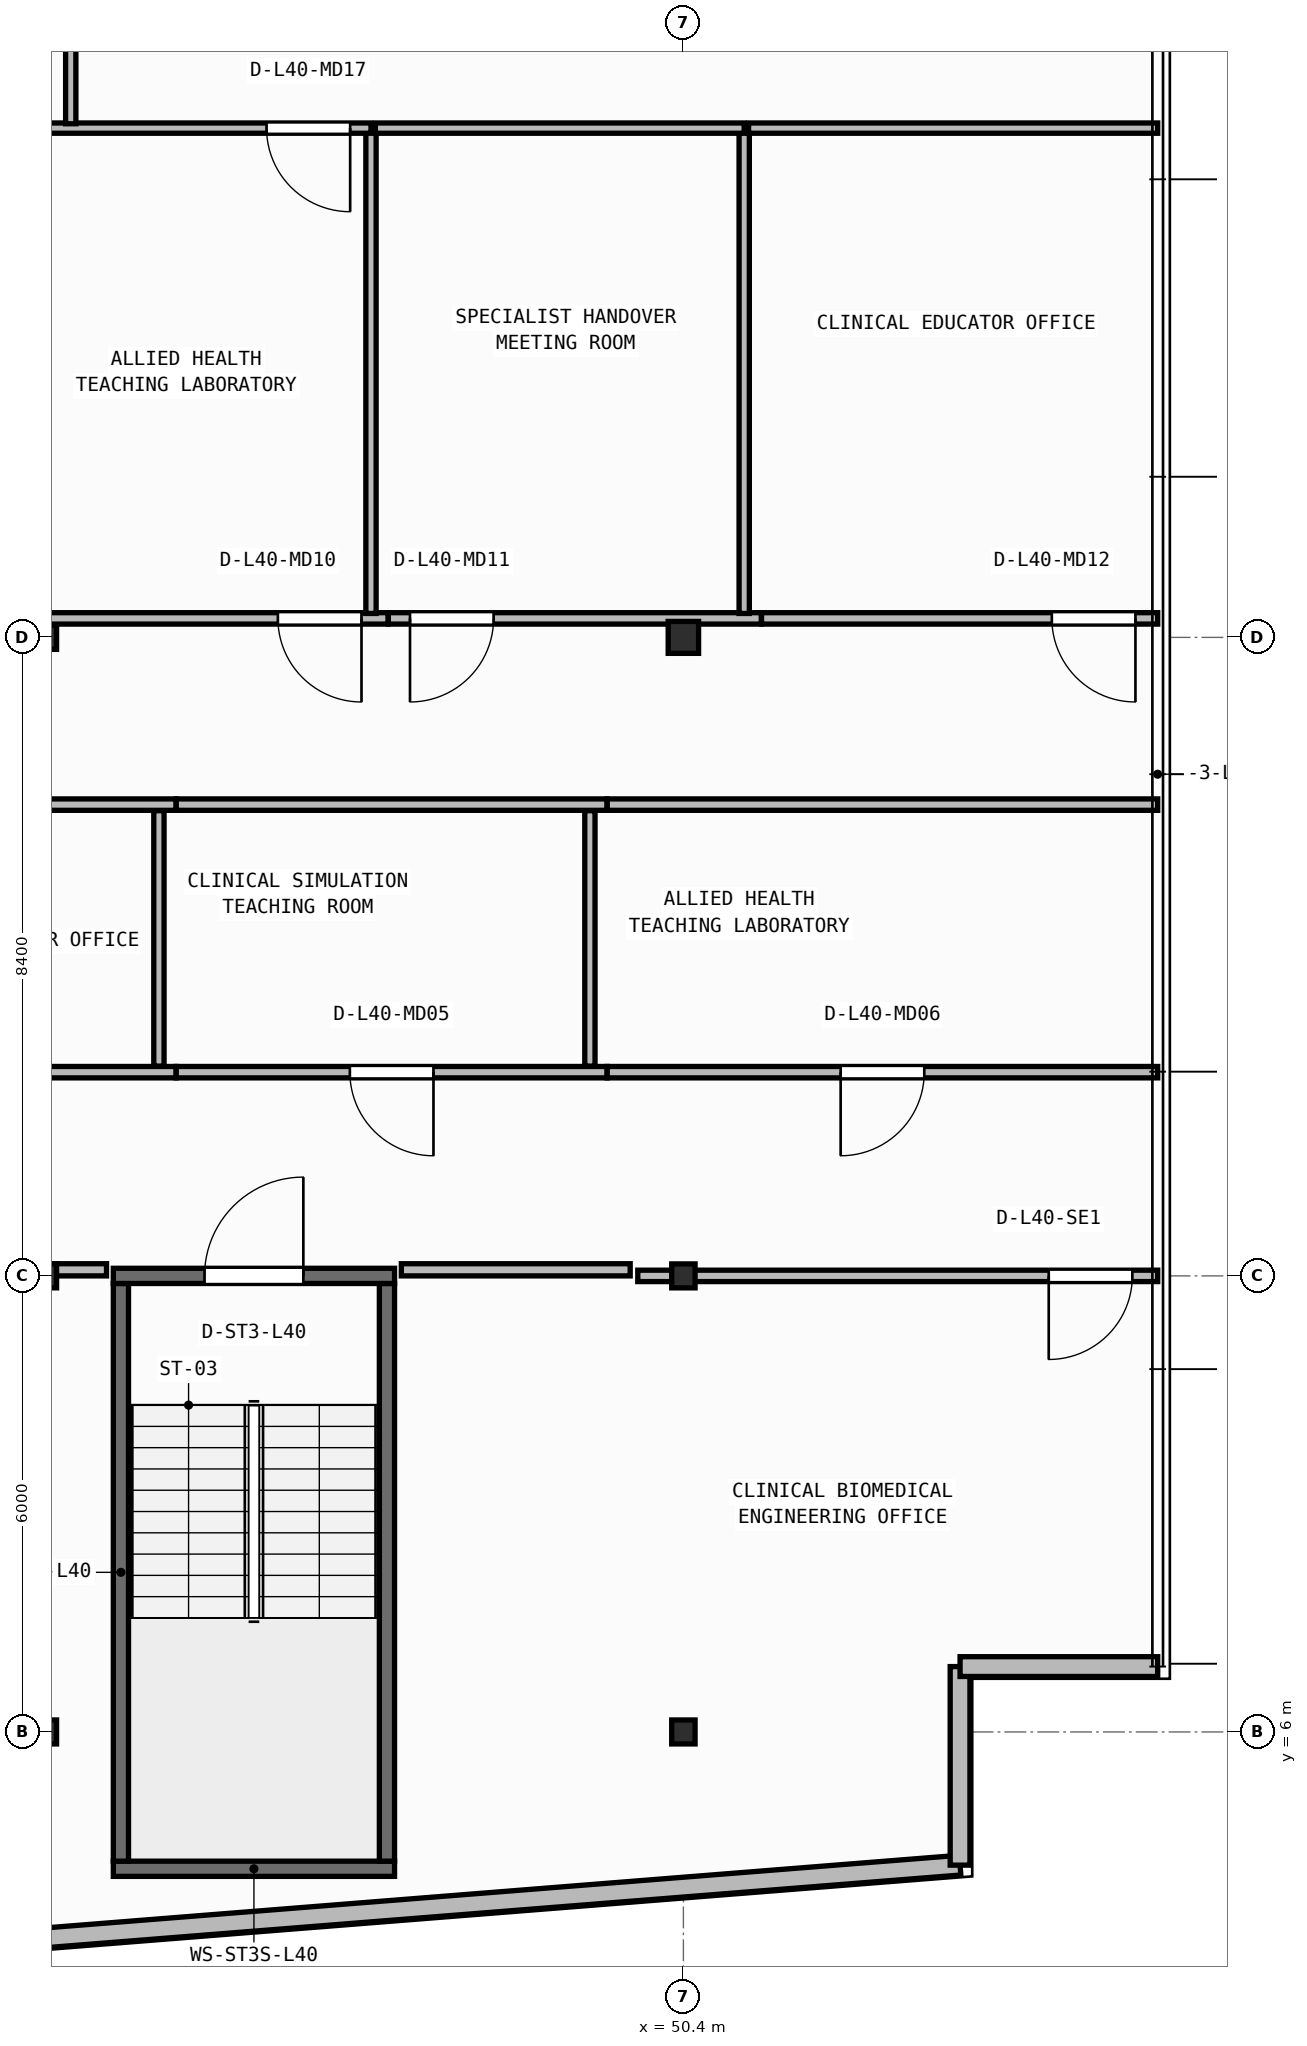
"""IFC4 building model, lengths in metres.
Left out: names, types, materials, properties, quantities, classifications, styles, units other than length and angle.
Written with IfcOpenShell. Run it as: python <this file> out.ifc"""

import sys

from ifc_helpers import new_model, si_unit, direction, frame, frame_2d, origin, origin_2d, place, context, subcontext, project, spatial, rectangle, i_section, extrude, element, fill, save


model = new_model("IFC4")
c1 = context("Model", 3, precision=1e-05, world=origin(), true_north=direction((0.0, 1.0)))
c2 = subcontext(c1, "Body", "Model", "MODEL_VIEW")
j1 = project(units=[si_unit("LENGTHUNIT", "METRE"), si_unit("PLANEANGLEUNIT", "RADIAN")], contexts=[c1])
p1 = place(None, origin())
s1 = spatial("IfcSite", under=j1, at=p1, CompositionType="ELEMENT")
p2 = place(p1, origin())
s2 = spatial("IfcBuilding", under=s1, at=p2, CompositionType="ELEMENT")
p3 = place(p2, frame((0.0, 0.0, 162.6)))
s3 = spatial("IfcBuildingStorey", under=s2, at=p3, CompositionType="ELEMENT", Elevation=162.6)
for number, where, z_axis, x_axis in (
    (1, (42.0, 6.0, 0.0), (0.0, 0.0, 1.0), (1.0, 0.0, 0.0)),
    (2, (50.4, 6.0, 0.0), (0.0, 0.0, 1.0), (1.0, 0.0, 0.0)),
    (3, (42.0, 12.0, 0.0), (0.0, 0.0, 1.0), (1.0, 0.0, 0.0)),
    (4, (50.4, 12.0, 0.0), (0.0, 0.0, 1.0), (1.0, 0.0, 0.0)),
    (5, (42.0, 20.4, 0.0), (0.0, 0.0, 1.0), (1.0, 0.0, 0.0)),
):
    element("IfcColumn", number, at=place(p3, frame(where, z_axis=z_axis, x_axis=x_axis)), inside=s3, PredefinedType="COLUMN", context=c2, shape_type="SweptSolid", body=[
        extrude(i_section(OverallWidth=0.307, OverallDepth=0.315, WebThickness=0.012, FlangeThickness=0.019, FilletRadius=0.017, at=origin_2d()), origin(), (0.0, 0.0, 1.0), 3.95),
    ])
p4 = place(p3, frame((50.4, 20.4, 0.0), z_axis=(0.0, 0.0, 1.0), x_axis=(1.0, 0.0, 0.0)))
e6 = element("IfcColumn", 6, at=p4, inside=s3, PredefinedType="COLUMN", context=c2, shape_type="SweptSolid", body=[
    extrude(i_section(OverallWidth=0.4, OverallDepth=0.42, WebThickness=0.025, FlangeThickness=0.04, at=origin_2d()), origin(), (0.0, 0.0, 1.0), 3.95),
])
p5 = place(p3, frame((2.76, 0.173, 0.0), z_axis=(0.0, 0.0, 1.0), x_axis=(0.996857931723, 0.079210251617, 0.0)))
e7 = element("IfcWall", 7, at=p5, inside=s3, PredefinedType="STANDARD", context=c2, shape_type="SweptSolid", body=[
    extrude(rectangle(XDim=51.442, YDim=0.26, at=frame_2d((25.721, 0.0))), origin(), (0.0, 0.0, 1.0), 3.71),
])
p6 = place(p5, frame((24.521, 0.0, 0.9)))
e8 = element("IfcOpeningElement", 8, at=p6, cuts=e7, PredefinedType="OPENING", context=c2, shape_type="SweptSolid", body=[
    extrude(rectangle(XDim=2.4, YDim=1.65, at=frame_2d((1.2, 0.825))), frame((0.0, 0.14, 0.0), z_axis=(0.0, -1.0, 0.0), x_axis=(1.0, 0.0, 0.0)), (0.0, 0.0, 1.0), 0.28),
])
p7 = place(p3, frame((54.04, 4.248, 0.0), z_axis=(0.0, 0.0, 1.0), x_axis=(0.0, 1.0, 0.0)))
e9 = element("IfcWall", 9, at=p7, inside=s3, PredefinedType="STANDARD", context=c2, shape_type="SweptSolid", body=[
    extrude(rectangle(XDim=2.612, YDim=0.26, at=frame_2d((1.306, 0.0))), origin(), (0.0, 0.0, 1.0), 3.71),
])
p8 = place(p3, frame((54.04, 6.86, 0.0), z_axis=(0.0, 0.0, 1.0), x_axis=(1.0, 0.0, 0.0)))
e10 = element("IfcWall", 10, at=p8, inside=s3, PredefinedType="STANDARD", context=c2, shape_type="SweptSolid", body=[
    extrude(rectangle(XDim=2.6, YDim=0.26, at=frame_2d((1.3, 0.0))), origin(), (0.0, 0.0, 1.0), 3.71),
])
p9 = place(p3, frame((42.9, 4.2, 0.0), z_axis=(0.0, 0.0, 1.0), x_axis=(1.0, 0.0, 0.0)))
e11 = element("IfcWall", 11, at=p9, inside=s3, PredefinedType="SHEAR", context=c2, shape_type="SweptSolid", body=[
    extrude(rectangle(XDim=3.7, YDim=0.2, at=frame_2d((1.85, 0.0))), origin(), (0.0, 0.0, 1.0), 3.71),
])
for number, where, z_axis, x_axis in (
    (12, (43.0, 4.3, 0.0), (0.0, 0.0, 1.0), (0.0, 1.0, 0.0)),
    (13, (46.5, 4.3, 0.0), (0.0, 0.0, 1.0), (0.0, 1.0, 0.0)),
):
    element("IfcWall", number, at=place(p3, frame(where, z_axis=z_axis, x_axis=x_axis)), inside=s3, PredefinedType="SHEAR", context=c2, shape_type="SweptSolid", body=[
        extrude(rectangle(XDim=7.6, YDim=0.2, at=frame_2d((3.8, 0.0))), origin(), (0.0, 0.0, 1.0), 3.71),
    ])
p10 = place(p3, frame((42.9, 12.0, 0.0), z_axis=(0.0, 0.0, 1.0), x_axis=(1.0, 0.0, 0.0)))
e14 = element("IfcWall", 14, at=p10, inside=s3, PredefinedType="SHEAR", context=c2, shape_type="SweptSolid", body=[
    extrude(rectangle(XDim=3.7, YDim=0.2, at=frame_2d((1.85, 0.0))), origin(), (0.0, 0.0, 1.0), 3.71),
])
p11 = place(p10, frame((1.2, 0.0, 0.0)))
e15 = element("IfcOpeningElement", 15, at=p11, cuts=e14, PredefinedType="OPENING", context=c2, shape_type="SweptSolid", body=[
    extrude(rectangle(XDim=1.3, YDim=2.15, at=frame_2d((0.65, 1.075))), frame((0.0, 0.11, 0.0), z_axis=(0.0, -1.0, 0.0), x_axis=(1.0, 0.0, 0.0)), (0.0, 0.0, 1.0), 0.22),
])
p12 = place(p3, frame((56.64, 12.0, 0.0), z_axis=(0.0, 0.0, 1.0), x_axis=(-1.0, 0.0, 0.0)))
e16 = element("IfcWall", 16, at=p12, inside=s3, PredefinedType="PARTITIONING", context=c2, shape_type="SweptSolid", body=[
    extrude(rectangle(XDim=6.84, YDim=0.15, at=frame_2d((3.42, 0.0))), origin(), (0.0, 0.0, 1.0), 3.083),
])
p13 = place(p12, frame((0.333, 0.0, 0.0)))
e17 = element("IfcOpeningElement", 17, at=p13, cuts=e16, PredefinedType="OPENING", context=c2, shape_type="SweptSolid", body=[
    extrude(rectangle(XDim=1.1, YDim=2.1, at=frame_2d((0.55, 1.05))), frame((0.0, 0.085, 0.0), z_axis=(0.0, -1.0, 0.0), x_axis=(1.0, 0.0, 0.0)), (0.0, 0.0, 1.0), 0.17),
])
p14 = place(p3, frame((43.726, 14.68, 0.0), z_axis=(0.0, 0.0, 1.0), x_axis=(-1.0, 0.0, 0.0)))
e18 = element("IfcWall", 18, at=p14, inside=s3, PredefinedType="PARTITIONING", context=c2, shape_type="SweptSolid", body=[
    extrude(rectangle(XDim=11.718, YDim=0.15, at=frame_2d((5.859, 0.0))), origin(), (0.0, 0.0, 1.0), 3.71),
])
p15 = place(p14, frame((5.309, 0.0, 0.0)))
e19 = element("IfcOpeningElement", 19, at=p15, cuts=e18, PredefinedType="OPENING", context=c2, shape_type="SweptSolid", body=[
    extrude(rectangle(XDim=1.1, YDim=2.1, at=frame_2d((0.55, 1.05))), frame((0.0, 0.085, 0.0), z_axis=(0.0, -1.0, 0.0), x_axis=(1.0, 0.0, 0.0)), (0.0, 0.0, 1.0), 0.17),
])
p16 = place(p3, frame((49.396, 14.68, 0.0), z_axis=(0.0, 0.0, 1.0), x_axis=(-1.0, 0.0, 0.0)))
e20 = element("IfcWall", 20, at=p16, inside=s3, PredefinedType="PARTITIONING", context=c2, shape_type="SweptSolid", body=[
    extrude(rectangle(XDim=5.668, YDim=0.15, at=frame_2d((2.834, 0.0))), origin(), (0.0, 0.0, 1.0), 3.71),
])
p17 = place(p16, frame((2.284, 0.0, 0.0)))
e21 = element("IfcOpeningElement", 21, at=p17, cuts=e20, PredefinedType="OPENING", context=c2, shape_type="SweptSolid", body=[
    extrude(rectangle(XDim=1.1, YDim=2.1, at=frame_2d((0.55, 1.05))), frame((0.0, 0.085, 0.0), z_axis=(0.0, -1.0, 0.0), x_axis=(1.0, 0.0, 0.0)), (0.0, 0.0, 1.0), 0.17),
])
p18 = place(p3, frame((56.64, 14.68, 0.0), z_axis=(0.0, 0.0, 1.0), x_axis=(-1.0, 0.0, 0.0)))
e22 = element("IfcWall", 22, at=p18, inside=s3, PredefinedType="PARTITIONING", context=c2, shape_type="SweptSolid", body=[
    extrude(rectangle(XDim=7.242, YDim=0.15, at=frame_2d((3.621, 0.0))), origin(), (0.0, 0.0, 1.0), 3.71),
])
p19 = place(p18, frame((3.071, 0.0, 0.0)))
e23 = element("IfcOpeningElement", 23, at=p19, cuts=e22, PredefinedType="OPENING", context=c2, shape_type="SweptSolid", body=[
    extrude(rectangle(XDim=1.1, YDim=2.1, at=frame_2d((0.55, 1.05))), frame((0.0, 0.085, 0.0), z_axis=(0.0, -1.0, 0.0), x_axis=(1.0, 0.0, 0.0)), (0.0, 0.0, 1.0), 0.17),
])
p20 = place(p3, frame((32.008, 18.2, 0.0), z_axis=(0.0, 0.0, 1.0), x_axis=(1.0, 0.0, 0.0)))
e24 = element("IfcWall", 24, at=p20, inside=s3, PredefinedType="PARTITIONING", context=c2, shape_type="SweptSolid", body=[
    extrude(rectangle(XDim=11.718, YDim=0.15, at=frame_2d((5.859, 0.0))), origin(), (0.0, 0.0, 1.0), 3.71),
])
p21 = place(p3, frame((43.728, 18.2, 0.0), z_axis=(0.0, 0.0, 1.0), x_axis=(1.0, 0.0, 0.0)))
e25 = element("IfcWall", 25, at=p21, inside=s3, PredefinedType="PARTITIONING", context=c2, shape_type="SweptSolid", body=[
    extrude(rectangle(XDim=5.668, YDim=0.15, at=frame_2d((2.834, 0.0))), origin(), (0.0, 0.0, 1.0), 3.71),
])
p22 = place(p3, frame((49.398, 18.2, 0.0), z_axis=(0.0, 0.0, 1.0), x_axis=(1.0, 0.0, 0.0)))
e26 = element("IfcWall", 26, at=p22, inside=s3, PredefinedType="PARTITIONING", context=c2, shape_type="SweptSolid", body=[
    extrude(rectangle(XDim=7.242, YDim=0.15, at=frame_2d((3.621, 0.0))), origin(), (0.0, 0.0, 1.0), 3.71),
])
p23 = place(p3, frame((46.516, 20.65, 0.0), z_axis=(0.0, 0.0, 1.0), x_axis=(-1.0, 0.0, 0.0)))
e27 = element("IfcWall", 27, at=p23, inside=s3, PredefinedType="PARTITIONING", context=c2, shape_type="SweptSolid", body=[
    extrude(rectangle(XDim=4.518, YDim=0.15, at=frame_2d((2.259, 0.0))), origin(), (0.0, 0.0, 1.0), 3.083),
])
p24 = place(p23, frame((0.351, 0.0, 0.0)))
e28 = element("IfcOpeningElement", 28, at=p24, cuts=e27, PredefinedType="OPENING", context=c2, shape_type="SweptSolid", body=[
    extrude(rectangle(XDim=1.1, YDim=2.1, at=frame_2d((0.55, 1.05))), frame((0.0, 0.085, 0.0), z_axis=(0.0, -1.0, 0.0), x_axis=(1.0, 0.0, 0.0)), (0.0, 0.0, 1.0), 0.17),
])
p25 = place(p3, frame((51.426, 20.65, 0.0), z_axis=(0.0, 0.0, 1.0), x_axis=(-1.0, 0.0, 0.0)))
e29 = element("IfcWall", 29, at=p25, inside=s3, PredefinedType="PARTITIONING", context=c2, shape_type="SweptSolid", body=[
    extrude(rectangle(XDim=4.908, YDim=0.15, at=frame_2d((2.454, 0.0))), origin(), (0.0, 0.0, 1.0), 3.083),
])
p26 = place(p25, frame((3.523, 0.0, 0.0)))
e30 = element("IfcOpeningElement", 30, at=p26, cuts=e29, PredefinedType="OPENING", context=c2, shape_type="SweptSolid", body=[
    extrude(rectangle(XDim=1.1, YDim=2.1, at=frame_2d((0.55, 1.05))), frame((0.0, 0.085, 0.0), z_axis=(0.0, -1.0, 0.0), x_axis=(1.0, 0.0, 0.0)), (0.0, 0.0, 1.0), 0.17),
])
p27 = place(p3, frame((56.64, 20.65, 0.0), z_axis=(0.0, 0.0, 1.0), x_axis=(-1.0, 0.0, 0.0)))
e31 = element("IfcWall", 31, at=p27, inside=s3, PredefinedType="PARTITIONING", context=c2, shape_type="SweptSolid", body=[
    extrude(rectangle(XDim=5.212, YDim=0.15, at=frame_2d((2.606, 0.0))), origin(), (0.0, 0.0, 1.0), 3.71),
])
p28 = place(p27, frame((0.293, 0.0, 0.0)))
e32 = element("IfcOpeningElement", 32, at=p28, cuts=e31, PredefinedType="OPENING", context=c2, shape_type="SweptSolid", body=[
    extrude(rectangle(XDim=1.1, YDim=2.1, at=frame_2d((0.55, 1.05))), frame((0.0, 0.085, 0.0), z_axis=(0.0, -1.0, 0.0), x_axis=(1.0, 0.0, 0.0)), (0.0, 0.0, 1.0), 0.17),
])
for number, where, z_axis, x_axis in (
    (33, (43.5, 14.76, 0.0), (0.0, 0.0, 1.0), (0.0, 1.0, 0.0)),
    (34, (49.17, 14.76, 0.0), (0.0, 0.0, 1.0), (0.0, 1.0, 0.0)),
):
    element("IfcWall", number, at=place(p3, frame(where, z_axis=z_axis, x_axis=x_axis)), inside=s3, PredefinedType="PARTITIONING", context=c2, shape_type="SweptSolid", body=[
        extrude(rectangle(XDim=3.36, YDim=0.135, at=frame_2d((1.68, 0.0))), origin(), (0.0, 0.0, 1.0), 3.71),
    ])
p29 = place(p3, frame((46.29, 20.715, 0.0), z_axis=(0.0, 0.0, 1.0), x_axis=(0.0, 1.0, 0.0)))
e35 = element("IfcWall", 35, at=p29, inside=s3, PredefinedType="PARTITIONING", context=c2, shape_type="SweptSolid", body=[
    extrude(rectangle(XDim=6.385, YDim=0.135, at=frame_2d((3.192, 0.0))), origin(), (0.0, 0.0, 1.0), 3.71),
])
p30 = place(p3, frame((46.29, 27.1, 0.0), z_axis=(0.0, 0.0, 1.0), x_axis=(-1.0, 0.0, 0.0)))
e36 = element("IfcWall", 36, at=p30, inside=s3, PredefinedType="PARTITIONING", context=c2, shape_type="SweptSolid", body=[
    extrude(rectangle(XDim=4.463, YDim=0.135, at=frame_2d((2.231, 0.0))), origin(), (0.0, 0.0, 1.0), 3.71),
])
p31 = place(p30, frame((0.274, 0.0, 0.0)))
e37 = element("IfcOpeningElement", 37, at=p31, cuts=e36, PredefinedType="OPENING", context=c2, shape_type="SweptSolid", body=[
    extrude(rectangle(XDim=1.1, YDim=2.1, at=frame_2d((0.55, 1.05))), frame((0.0, 0.077, 0.0), z_axis=(0.0, -1.0, 0.0), x_axis=(1.0, 0.0, 0.0)), (0.0, 0.0, 1.0), 0.155),
])
p32 = place(p3, frame((51.2, 20.715, 0.0), z_axis=(0.0, 0.0, 1.0), x_axis=(0.0, 1.0, 0.0)))
e38 = element("IfcWall", 38, at=p32, inside=s3, PredefinedType="PARTITIONING", context=c2, shape_type="SweptSolid", body=[
    extrude(rectangle(XDim=6.385, YDim=0.135, at=frame_2d((3.192, 0.0))), origin(), (0.0, 0.0, 1.0), 3.71),
])
p33 = place(p3, frame((51.2, 27.1, 0.0), z_axis=(0.0, 0.0, 1.0), x_axis=(-1.0, 0.0, 0.0)))
e39 = element("IfcWall", 39, at=p33, inside=s3, PredefinedType="PARTITIONING", context=c2, shape_type="SweptSolid", body=[
    extrude(rectangle(XDim=4.853, YDim=0.135, at=frame_2d((2.426, 0.0))), origin(), (0.0, 0.0, 1.0), 3.71),
])
p34 = place(p3, frame((56.64, 27.1, 0.0), z_axis=(0.0, 0.0, 1.0), x_axis=(-1.0, 0.0, 0.0)))
e40 = element("IfcWall", 40, at=p34, inside=s3, PredefinedType="PARTITIONING", context=c2, shape_type="SweptSolid", body=[
    extrude(rectangle(XDim=5.382, YDim=0.135, at=frame_2d((2.691, 0.0))), origin(), (0.0, 0.0, 1.0), 3.71),
])
p35 = place(p3, frame((42.34, 27.157, 0.0), z_axis=(0.0, 0.0, 1.0), x_axis=(0.0, 1.0, 0.0)))
e41 = element("IfcWall", 41, at=p35, inside=s3, PredefinedType="PARTITIONING", context=c2, shape_type="SweptSolid", body=[
    extrude(rectangle(XDim=4.344, YDim=0.135, at=frame_2d((2.172, 0.0))), origin(), (0.0, 0.0, 1.0), 3.152),
])
p36 = place(p3, frame((40.03, 12.08, 0.0), z_axis=(0.0, 0.0, 1.0), x_axis=(1.0, 0.0, 0.0)))
e42 = element("IfcWall", 42, at=p36, inside=s3, PredefinedType="PARTITIONING", context=c2, shape_type="SweptSolid", body=[
    extrude(rectangle(XDim=2.781, YDim=0.16, at=frame_2d((1.39, 0.0))), origin(), (0.0, 0.0, 1.0), 3.083),
])
p37 = place(p3, frame((46.689, 12.08, 0.0), z_axis=(0.0, 0.0, 1.0), x_axis=(1.0, 0.0, 0.0)))
e43 = element("IfcWall", 43, at=p37, inside=s3, PredefinedType="PARTITIONING", context=c2, shape_type="SweptSolid", body=[
    extrude(rectangle(XDim=3.011, YDim=0.16, at=frame_2d((1.505, 0.0))), origin(), (0.0, 0.0, 1.0), 3.083),
])
p38 = place(p11, origin())
e44 = element("IfcDoor", 44, at=p38, inside=s3, OperationType="SINGLE_SWING_RIGHT", PredefinedType="DOOR", context=c2, shape_type="SweptSolid", body=[
    extrude(rectangle(XDim=1.3, YDim=2.15, at=frame_2d((0.65, 1.075))), frame((0.0, 0.025, 0.0), z_axis=(0.0, -1.0, 0.0), x_axis=(1.0, 0.0, 0.0)), (0.0, 0.0, 1.0), 0.05),
])
fill(e15, e44)
p39 = place(p13, origin())
e45 = element("IfcDoor", 45, at=p39, inside=s3, OperationType="SINGLE_SWING_RIGHT", PredefinedType="DOOR", context=c2, shape_type="SweptSolid", body=[
    extrude(rectangle(XDim=1.1, YDim=2.1, at=frame_2d((0.55, 1.05))), frame((0.0, 0.025, 0.0), z_axis=(0.0, -1.0, 0.0), x_axis=(1.0, 0.0, 0.0)), (0.0, 0.0, 1.0), 0.05),
])
fill(e17, e45)
p40 = place(p17, origin())
e46 = element("IfcDoor", 46, at=p40, inside=s3, OperationType="SINGLE_SWING_LEFT", PredefinedType="DOOR", context=c2, shape_type="SweptSolid", body=[
    extrude(rectangle(XDim=1.1, YDim=2.1, at=frame_2d((0.55, 1.05))), frame((0.0, 0.025, 0.0), z_axis=(0.0, -1.0, 0.0), x_axis=(1.0, 0.0, 0.0)), (0.0, 0.0, 1.0), 0.05),
])
fill(e21, e46)
p41 = place(p19, origin())
e47 = element("IfcDoor", 47, at=p41, inside=s3, OperationType="SINGLE_SWING_RIGHT", PredefinedType="DOOR", context=c2, shape_type="SweptSolid", body=[
    extrude(rectangle(XDim=1.1, YDim=2.1, at=frame_2d((0.55, 1.05))), frame((0.0, 0.025, 0.0), z_axis=(0.0, -1.0, 0.0), x_axis=(1.0, 0.0, 0.0)), (0.0, 0.0, 1.0), 0.05),
])
fill(e23, e47)
p42 = place(p24, origin())
e48 = element("IfcDoor", 48, at=p42, inside=s3, OperationType="SINGLE_SWING_LEFT", PredefinedType="DOOR", context=c2, shape_type="SweptSolid", body=[
    extrude(rectangle(XDim=1.1, YDim=2.1, at=frame_2d((0.55, 1.05))), frame((0.0, 0.025, 0.0), z_axis=(0.0, -1.0, 0.0), x_axis=(1.0, 0.0, 0.0)), (0.0, 0.0, 1.0), 0.05),
])
fill(e28, e48)
p43 = place(p26, origin())
e49 = element("IfcDoor", 49, at=p43, inside=s3, OperationType="SINGLE_SWING_RIGHT", PredefinedType="DOOR", context=c2, shape_type="SweptSolid", body=[
    extrude(rectangle(XDim=1.1, YDim=2.1, at=frame_2d((0.55, 1.05))), frame((0.0, 0.025, 0.0), z_axis=(0.0, -1.0, 0.0), x_axis=(1.0, 0.0, 0.0)), (0.0, 0.0, 1.0), 0.05),
])
fill(e30, e49)
p44 = place(p28, origin())
e50 = element("IfcDoor", 50, at=p44, inside=s3, OperationType="SINGLE_SWING_LEFT", PredefinedType="DOOR", context=c2, shape_type="SweptSolid", body=[
    extrude(rectangle(XDim=1.1, YDim=2.1, at=frame_2d((0.55, 1.05))), frame((0.0, 0.025, 0.0), z_axis=(0.0, -1.0, 0.0), x_axis=(1.0, 0.0, 0.0)), (0.0, 0.0, 1.0), 0.05),
])
fill(e32, e50)
p45 = place(p31, origin())
e51 = element("IfcDoor", 51, at=p45, inside=s3, OperationType="SINGLE_SWING_LEFT", PredefinedType="DOOR", context=c2, shape_type="SweptSolid", body=[
    extrude(rectangle(XDim=1.1, YDim=2.1, at=frame_2d((0.55, 1.05))), frame((0.0, 0.025, 0.0), z_axis=(0.0, -1.0, 0.0), x_axis=(1.0, 0.0, 0.0)), (0.0, 0.0, 1.0), 0.05),
])
fill(e37, e51)
save(model, sys.argv[1])
